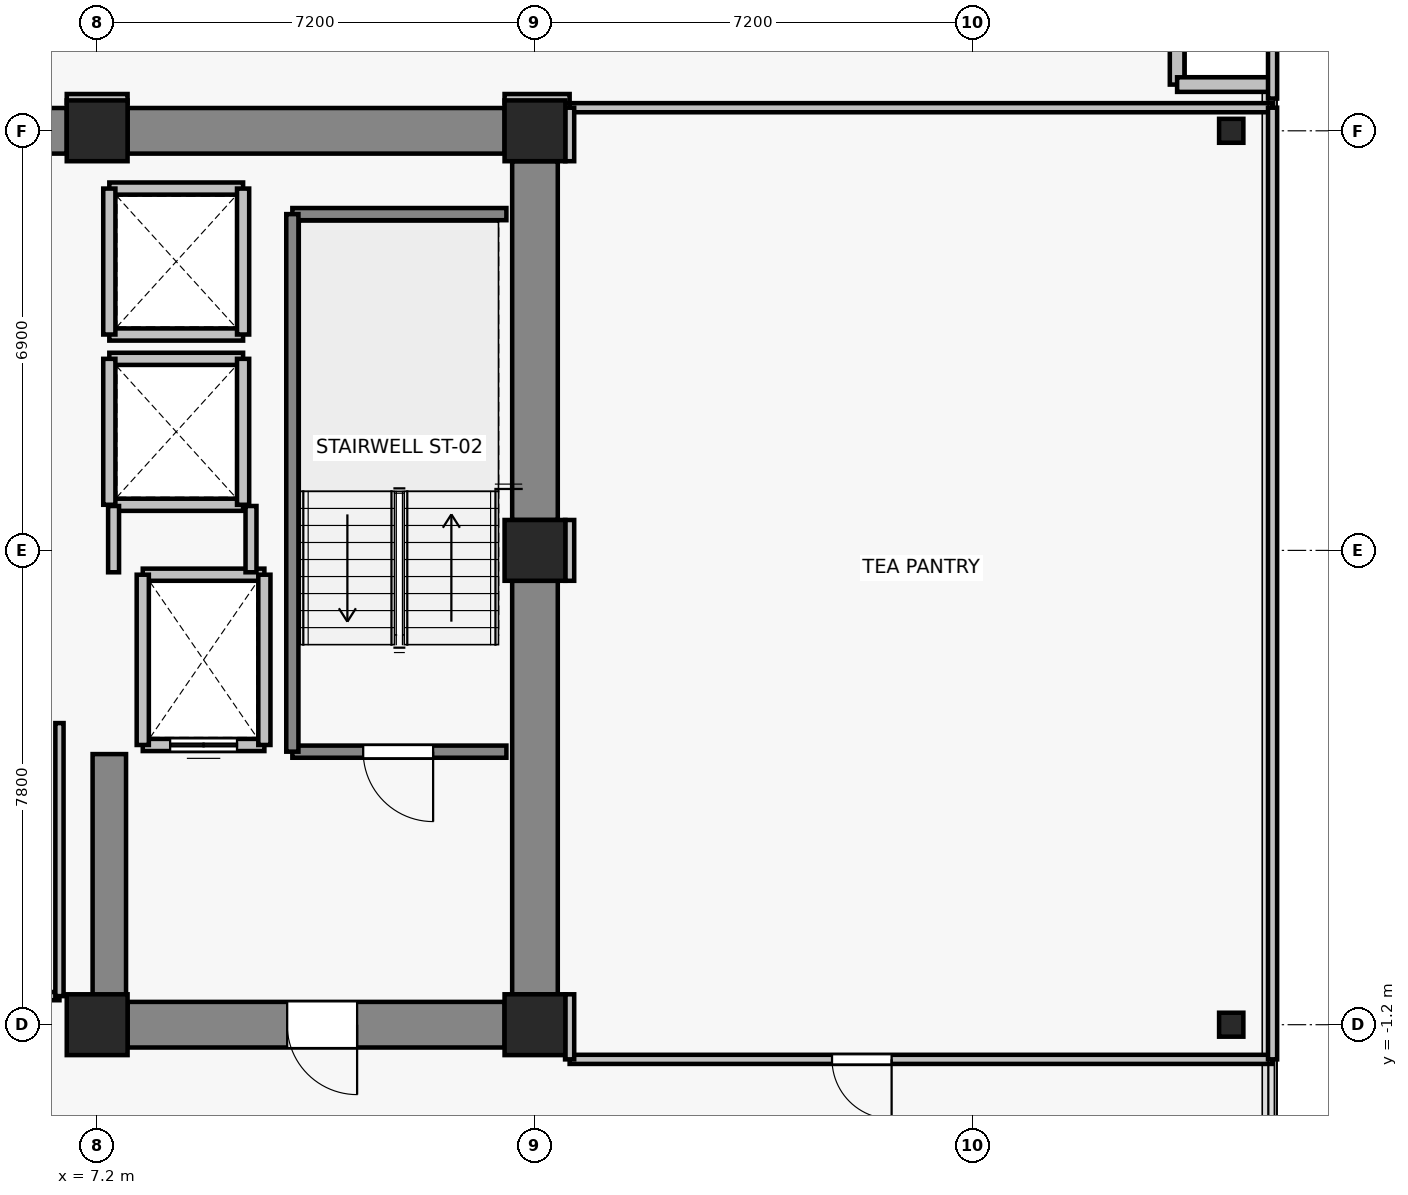
"""IFC4 building model, lengths in metres.
Left out: names, types, materials, properties, quantities, classifications, styles, units other than length and angle.
Written with IfcOpenShell. Run it as: python <this file> out.ifc"""

import sys

from ifc_helpers import new_model, si_unit, direction, frame, frame_2d, origin, origin_2d, place, context, subcontext, project, spatial, rectangle, i_section, extrude, source, transform, mapped, element, fill, save


model = new_model("IFC4")
c1 = context("Model", 3, precision=1e-05, world=origin(), true_north=direction((0.0, 1.0)))
c2 = subcontext(c1, "Body", "Model", "MODEL_VIEW")
j1 = project(units=[si_unit("LENGTHUNIT", "METRE"), si_unit("PLANEANGLEUNIT", "RADIAN")], contexts=[c1])
p1 = place(None, origin())
s1 = spatial("IfcSite", under=j1, at=p1, CompositionType="ELEMENT")
p2 = place(p1, origin())
s2 = spatial("IfcBuilding", under=s1, at=p2, CompositionType="ELEMENT")
p3 = place(p2, frame((0.0, 0.0, 172.6)))
s3 = spatial("IfcBuildingStorey", under=s2, at=p3, CompositionType="ELEMENT", Elevation=172.6)
for number, where, z_axis, x_axis in (
    (1, (7.2, -1.2, 0.0), (0.0, 0.0, 1.0), (1.0, 0.0, 0.0)),
    (2, (14.4, -1.2, 0.0), (0.0, 0.0, 1.0), (1.0, 0.0, 0.0)),
    (3, (14.4, 6.6, 0.0), (0.0, 0.0, 1.0), (1.0, 0.0, 0.0)),
    (4, (7.2, 13.5, 0.0), (0.0, 0.0, 1.0), (1.0, 0.0, 0.0)),
    (5, (14.4, 13.5, 0.0), (0.0, 0.0, 1.0), (1.0, 0.0, 0.0)),
):
    element("IfcColumn", number, at=place(p3, frame(where, z_axis=z_axis, x_axis=x_axis)), inside=s3, PredefinedType="COLUMN", context=c2, shape_type="SweptSolid", body=[
        extrude(rectangle(XDim=1.0, YDim=1.0, at=origin_2d()), origin(), (0.0, 0.0, 1.0), 3.3),
    ])
for number, where, z_axis, x_axis in (
    (6, (25.85, -1.2, 0.0), (0.0, 0.0, 1.0), (1.0, 0.0, 0.0)),
    (7, (25.85, 13.5, 0.0), (0.0, 0.0, 1.0), (1.0, 0.0, 0.0)),
):
    element("IfcColumn", number, at=place(p3, frame(where, z_axis=z_axis, x_axis=x_axis)), inside=s3, PredefinedType="COLUMN", context=c2, shape_type="SweptSolid", body=[
        extrude(i_section(OverallWidth=0.399, OverallDepth=0.394, WebThickness=0.023, FlangeThickness=0.037, FilletRadius=0.015, at=origin_2d()), origin(), (0.0, 0.0, 1.0), 3.3),
    ])
p4 = place(p3, frame((-6.7, 13.5, 0.0), z_axis=(0.0, 0.0, 1.0), x_axis=(1.0, 0.0, 0.0)))
e8 = element("IfcWall", 8, at=p4, inside=s3, PredefinedType="SHEAR", context=c2, shape_type="SweptSolid", body=[
    extrude(rectangle(XDim=13.4, YDim=0.75, at=frame_2d((6.7, 0.0))), origin(), (0.0, 0.0, 1.0), 3.075),
])
p5 = place(p3, frame((7.7, 13.5, 0.0), z_axis=(0.0, 0.0, 1.0), x_axis=(1.0, 0.0, 0.0)))
e9 = element("IfcWall", 9, at=p5, inside=s3, PredefinedType="SHEAR", context=c2, shape_type="SweptSolid", body=[
    extrude(rectangle(XDim=6.2, YDim=0.75, at=frame_2d((3.1, 0.0))), origin(), (0.0, 0.0, 1.0), 3.075),
])
p6 = place(p3, frame((14.4, -0.7, 0.0), z_axis=(0.0, 0.0, 1.0), x_axis=(0.0, 1.0, 0.0)))
e10 = element("IfcWall", 10, at=p6, inside=s3, PredefinedType="SHEAR", context=c2, shape_type="SweptSolid", body=[
    extrude(rectangle(XDim=6.8, YDim=0.75, at=frame_2d((3.4, 0.0))), origin(), (0.0, 0.0, 1.0), 3.075),
])
p7 = place(p3, frame((14.4, 7.1, 0.0), z_axis=(0.0, 0.0, 1.0), x_axis=(0.0, 1.0, 0.0)))
e11 = element("IfcWall", 11, at=p7, inside=s3, PredefinedType="SHEAR", context=c2, shape_type="SweptSolid", body=[
    extrude(rectangle(XDim=5.9, YDim=0.75, at=frame_2d((2.95, 0.0))), origin(), (0.0, 0.0, 1.0), 3.075),
])
p8 = place(p3, frame((13.9, -1.2, 0.0), z_axis=(0.0, 0.0, 1.0), x_axis=(-1.0, 0.0, 0.0)))
e12 = element("IfcWall", 12, at=p8, inside=s3, PredefinedType="SHEAR", context=c2, shape_type="SweptSolid", body=[
    extrude(rectangle(XDim=6.2, YDim=0.75, at=frame_2d((3.1, 0.0))), origin(), (0.0, 0.0, 1.0), 3.075),
])
p9 = place(p8, frame((2.425, 0.0, 0.0)))
e13 = element("IfcOpeningElement", 13, at=p9, cuts=e12, PredefinedType="OPENING", context=c2, shape_type="SweptSolid", body=[
    extrude(rectangle(XDim=1.15, YDim=2.15, at=frame_2d((0.575, 1.075))), frame((0.0, 0.385, 0.0), z_axis=(0.0, -1.0, 0.0), x_axis=(1.0, 0.0, 0.0)), (0.0, 0.0, 1.0), 0.77),
])
p10 = place(p3, frame((7.4, -0.825, 0.0), z_axis=(0.0, 0.0, 1.0), x_axis=(0.0, 1.0, 0.0)))
e14 = element("IfcWall", 14, at=p10, inside=s3, PredefinedType="SHEAR", context=c2, shape_type="SweptSolid", body=[
    extrude(rectangle(XDim=4.075, YDim=0.55, at=frame_2d((2.038, 0.0))), origin(), (0.0, 0.0, 1.0), 3.075),
])
for number, where, z_axis, x_axis in (
    (15, (24.96, 14.26, 0.0), (0.0, 0.0, 1.0), (0.0, 1.0, 0.0)),
    (16, (26.46, 14.26, 0.0), (0.0, 0.0, 1.0), (-1.0, 0.0, 0.0)),
):
    element("IfcWall", number, at=place(p3, frame(where, z_axis=z_axis, x_axis=x_axis)), inside=s3, PredefinedType="SOLIDWALL", context=c2, shape_type="SweptSolid", body=[
        extrude(rectangle(XDim=1.5, YDim=0.24, at=frame_2d((0.75, 0.0))), origin(), (0.0, 0.0, 1.0), 3.075),
    ])
p11 = place(p3, frame((9.95, 3.4, 0.0), z_axis=(0.0, 0.0, 1.0), x_axis=(-1.0, 0.0, 0.0)))
e17 = element("IfcWall", 17, at=p11, inside=s3, PredefinedType="SOLIDWALL", context=c2, shape_type="SweptSolid", body=[
    extrude(rectangle(XDim=2.0, YDim=0.2, at=frame_2d((1.0, 0.0))), origin(), (0.0, 0.0, 1.0), 3.075),
])
p12 = place(p11, frame((0.45, 0.0, 0.0)))
e18 = element("IfcOpeningElement", 18, at=p12, cuts=e17, PredefinedType="OPENING", context=c2, shape_type="SweptSolid", body=[
    extrude(rectangle(XDim=1.1, YDim=2.2, at=frame_2d((0.55, 1.1))), frame((0.0, 0.11, 0.0), z_axis=(0.0, -1.0, 0.0), x_axis=(1.0, 0.0, 0.0)), (0.0, 0.0, 1.0), 0.22),
])
p13 = place(p3, frame((7.95, 6.2, 0.0), z_axis=(0.0, 0.0, 1.0), x_axis=(1.0, 0.0, 0.0)))
e19 = element("IfcWall", 19, at=p13, inside=s3, PredefinedType="SOLIDWALL", context=c2, shape_type="SweptSolid", body=[
    extrude(rectangle(XDim=2.0, YDim=0.2, at=frame_2d((1.0, 0.0))), origin(), (0.0, 0.0, 1.0), 3.075),
])
for number, where, z_axis, x_axis in (
    (20, (7.95, 3.4, 0.0), (0.0, 0.0, 1.0), (0.0, 1.0, 0.0)),
    (21, (9.95, 6.2, 0.0), (0.0, 0.0, 1.0), (0.0, -1.0, 0.0)),
):
    element("IfcWall", number, at=place(p3, frame(where, z_axis=z_axis, x_axis=x_axis)), inside=s3, PredefinedType="SOLIDWALL", context=c2, shape_type="SweptSolid", body=[
        extrude(rectangle(XDim=2.8, YDim=0.2, at=frame_2d((1.4, 0.0))), origin(), (0.0, 0.0, 1.0), 3.075),
    ])
for number, where, z_axis, x_axis in (
    (22, (9.6, 7.35, 0.0), (0.0, 0.0, 1.0), (-1.0, 0.0, 0.0)),
    (23, (7.4, 9.75, 0.0), (0.0, 0.0, 1.0), (1.0, 0.0, 0.0)),
):
    element("IfcWall", number, at=place(p3, frame(where, z_axis=z_axis, x_axis=x_axis)), inside=s3, PredefinedType="SOLIDWALL", context=c2, shape_type="SweptSolid", body=[
        extrude(rectangle(XDim=2.2, YDim=0.2, at=frame_2d((1.1, 0.0))), origin(), (0.0, 0.0, 1.0), 2.565),
    ])
p14 = place(p3, frame((7.4, 7.35, 0.0), z_axis=(0.0, 0.0, 1.0), x_axis=(0.0, 1.0, 0.0)))
e24 = element("IfcWall", 24, at=p14, inside=s3, PredefinedType="SOLIDWALL", context=c2, shape_type="SweptSolid", body=[
    extrude(rectangle(XDim=2.4, YDim=0.2, at=frame_2d((1.2, 0.0))), origin(), (0.0, 0.0, 1.0), 2.565),
])
p15 = place(p3, frame((9.6, 9.75, 0.0), z_axis=(0.0, 0.0, 1.0), x_axis=(0.0, -1.0, 0.0)))
e25 = element("IfcWall", 25, at=p15, inside=s3, PredefinedType="SOLIDWALL", context=c2, shape_type="SweptSolid", body=[
    extrude(rectangle(XDim=2.4, YDim=0.2, at=frame_2d((1.2, 0.0))), origin(), (0.0, 0.0, 1.0), 3.075),
])
for number, where, z_axis, x_axis in (
    (26, (9.6, 10.15, 0.0), (0.0, 0.0, 1.0), (-1.0, 0.0, 0.0)),
    (27, (7.4, 12.55, 0.0), (0.0, 0.0, 1.0), (1.0, 0.0, 0.0)),
):
    element("IfcWall", number, at=place(p3, frame(where, z_axis=z_axis, x_axis=x_axis)), inside=s3, PredefinedType="SOLIDWALL", context=c2, shape_type="SweptSolid", body=[
        extrude(rectangle(XDim=2.2, YDim=0.2, at=frame_2d((1.1, 0.0))), origin(), (0.0, 0.0, 1.0), 2.565),
    ])
p16 = place(p3, frame((7.4, 10.15, 0.0), z_axis=(0.0, 0.0, 1.0), x_axis=(0.0, 1.0, 0.0)))
e28 = element("IfcWall", 28, at=p16, inside=s3, PredefinedType="SOLIDWALL", context=c2, shape_type="SweptSolid", body=[
    extrude(rectangle(XDim=2.4, YDim=0.2, at=frame_2d((1.2, 0.0))), origin(), (0.0, 0.0, 1.0), 2.565),
])
p17 = place(p3, frame((9.6, 12.55, 0.0), z_axis=(0.0, 0.0, 1.0), x_axis=(0.0, -1.0, 0.0)))
e29 = element("IfcWall", 29, at=p17, inside=s3, PredefinedType="SOLIDWALL", context=c2, shape_type="SweptSolid", body=[
    extrude(rectangle(XDim=2.4, YDim=0.2, at=frame_2d((1.2, 0.0))), origin(), (0.0, 0.0, 1.0), 3.075),
])
p18 = place(p3, frame((13.93, 3.29, 0.0), z_axis=(0.0, 0.0, 1.0), x_axis=(-1.0, 0.0, 0.0)))
e30 = element("IfcWall", 30, at=p18, inside=s3, PredefinedType="SOLIDWALL", context=c2, shape_type="SweptSolid", body=[
    extrude(rectangle(XDim=3.52, YDim=0.2, at=frame_2d((1.76, 0.0))), origin(), (0.0, 0.0, 1.0), 3.075),
])
p19 = place(p18, frame((1.205, 0.0, 0.0)))
e31 = element("IfcOpeningElement", 31, at=p19, cuts=e30, PredefinedType="OPENING", context=c2, shape_type="SweptSolid", body=[
    extrude(rectangle(XDim=1.15, YDim=2.15, at=frame_2d((0.575, 1.075))), frame((0.0, 0.11, 0.0), z_axis=(0.0, -1.0, 0.0), x_axis=(1.0, 0.0, 0.0)), (0.0, 0.0, 1.0), 0.22),
])
p20 = place(p3, frame((10.41, 12.13, 0.0), z_axis=(0.0, 0.0, 1.0), x_axis=(1.0, 0.0, 0.0)))
e32 = element("IfcWall", 32, at=p20, inside=s3, PredefinedType="SOLIDWALL", context=c2, shape_type="SweptSolid", body=[
    extrude(rectangle(XDim=3.52, YDim=0.2, at=frame_2d((1.76, 0.0))), origin(), (0.0, 0.0, 1.0), 3.075),
])
p21 = place(p3, frame((10.41, 3.29, 0.0), z_axis=(0.0, 0.0, 1.0), x_axis=(0.0, 1.0, 0.0)))
e33 = element("IfcWall", 33, at=p21, inside=s3, PredefinedType="SOLIDWALL", context=c2, shape_type="SweptSolid", body=[
    extrude(rectangle(XDim=8.84, YDim=0.2, at=frame_2d((4.42, 0.0))), origin(), (0.0, 0.0, 1.0), 3.075),
])
p22 = place(p3, frame((7.47, 6.24, 0.0), z_axis=(0.0, 0.0, 1.0), x_axis=(0.0, 1.0, 0.0)))
e34 = element("IfcWall", 34, at=p22, inside=s3, PredefinedType="PARTITIONING", context=c2, shape_type="SweptSolid", body=[
    extrude(rectangle(XDim=1.09, YDim=0.18, at=frame_2d((0.545, 0.0))), origin(), (0.0, 0.0, 1.0), 2.565),
])
p23 = place(p3, frame((9.73, 7.33, 0.0), z_axis=(0.0, 0.0, 1.0), x_axis=(0.0, -1.0, 0.0)))
e35 = element("IfcWall", 35, at=p23, inside=s3, PredefinedType="PARTITIONING", context=c2, shape_type="SweptSolid", body=[
    extrude(rectangle(XDim=1.09, YDim=0.18, at=frame_2d((0.545, 0.0))), origin(), (0.0, 0.0, 1.0), 3.075),
])
p24 = place(p3, frame((6.58, -0.73, 0.0), z_axis=(0.0, 0.0, 1.0), x_axis=(-1.0, 0.0, 0.0)))
e36 = element("IfcWall", 36, at=p24, inside=s3, PredefinedType="PARTITIONING", context=c2, shape_type="SweptSolid", body=[
    extrude(rectangle(XDim=2.9, YDim=0.135, at=frame_2d((1.45, 0.0))), origin(), (0.0, 0.0, 1.0), 3.075),
])
p25 = place(p24, frame((0.99, 0.0, 0.0)))
e37 = element("IfcOpeningElement", 37, at=p25, cuts=e36, PredefinedType="OPENING", context=c2, shape_type="SweptSolid", body=[
    extrude(rectangle(XDim=0.92, YDim=2.1, at=frame_2d((0.46, 1.05))), frame((0.0, 0.077, 0.0), z_axis=(0.0, -1.0, 0.0), x_axis=(1.0, 0.0, 0.0)), (0.0, 0.0, 1.0), 0.155),
])
p26 = place(p3, frame((6.58, 3.76, 0.0), z_axis=(0.0, 0.0, 1.0), x_axis=(0.0, -1.0, 0.0)))
e38 = element("IfcWall", 38, at=p26, inside=s3, PredefinedType="PARTITIONING", context=c2, shape_type="SweptSolid", body=[
    extrude(rectangle(XDim=4.49, YDim=0.135, at=frame_2d((2.245, 0.0))), origin(), (0.0, 0.0, 1.0), 3.075),
])
p27 = place(p3, frame((26.53, -1.77, 0.0), z_axis=(0.0, 0.0, 1.0), x_axis=(-1.0, 0.0, 0.0)))
e39 = element("IfcWall", 39, at=p27, inside=s3, PredefinedType="PARTITIONING", context=c2, shape_type="SweptSolid", body=[
    extrude(rectangle(XDim=11.56, YDim=0.15, at=frame_2d((5.78, 0.0))), origin(), (0.0, 0.0, 1.0), 2.565),
])
p28 = place(p27, frame((6.265, 0.0, 0.0)))
e40 = element("IfcOpeningElement", 40, at=p28, cuts=e39, PredefinedType="OPENING", context=c2, shape_type="SweptSolid", body=[
    extrude(rectangle(XDim=0.98, YDim=2.15, at=frame_2d((0.49, 1.075))), frame((0.0, 0.085, 0.0), z_axis=(0.0, -1.0, 0.0), x_axis=(1.0, 0.0, 0.0)), (0.0, 0.0, 1.0), 0.17),
])
p29 = place(p3, frame((14.97, 13.88, 0.0), z_axis=(0.0, 0.0, 1.0), x_axis=(1.0, 0.0, 0.0)))
e41 = element("IfcWall", 41, at=p29, inside=s3, PredefinedType="PARTITIONING", context=c2, shape_type="SweptSolid", body=[
    extrude(rectangle(XDim=11.56, YDim=0.15, at=frame_2d((5.78, 0.0))), origin(), (0.0, 0.0, 1.0), 3.075),
])
p30 = place(p3, frame((14.97, -1.77, 0.0), z_axis=(0.0, 0.0, 1.0), x_axis=(0.0, 1.0, 0.0)))
e42 = element("IfcWall", 42, at=p30, inside=s3, PredefinedType="PARTITIONING", context=c2, shape_type="SweptSolid", body=[
    extrude(rectangle(XDim=1.07, YDim=0.15, at=frame_2d((0.535, 0.0))), origin(), (0.0, 0.0, 1.0), 2.565),
])
p31 = place(p3, frame((14.97, 6.1, 0.0), z_axis=(0.0, 0.0, 1.0), x_axis=(0.0, 1.0, 0.0)))
e43 = element("IfcWall", 43, at=p31, inside=s3, PredefinedType="PARTITIONING", context=c2, shape_type="SweptSolid", body=[
    extrude(rectangle(XDim=1.0, YDim=0.15, at=frame_2d((0.5, 0.0))), origin(), (0.0, 0.0, 1.0), 3.075),
])
p32 = place(p3, frame((14.97, 13.0, 0.0), z_axis=(0.0, 0.0, 1.0), x_axis=(0.0, 1.0, 0.0)))
e44 = element("IfcWall", 44, at=p32, inside=s3, PredefinedType="PARTITIONING", context=c2, shape_type="SweptSolid", body=[
    extrude(rectangle(XDim=0.88, YDim=0.15, at=frame_2d((0.44, 0.0))), origin(), (0.0, 0.0, 1.0), 2.565),
])
p33 = place(p3, frame((26.53, 13.88, 0.0), z_axis=(0.0, 0.0, 1.0), x_axis=(0.0, -1.0, 0.0)))
e45 = element("IfcWall", 45, at=p33, inside=s3, PredefinedType="PARTITIONING", context=c2, shape_type="SweptSolid", body=[
    extrude(rectangle(XDim=15.65, YDim=0.15, at=frame_2d((7.825, 0.0))), origin(), (0.0, 0.0, 1.0), 3.075),
])
p34 = place(p3, frame((7.7, 14.03, 0.0), z_axis=(0.0, 0.0, 1.0), x_axis=(-1.0, 0.0, 0.0)))
e46 = element("IfcWall", 46, at=p34, inside=s3, PredefinedType="PARTITIONING", context=c2, shape_type="SweptSolid", body=[
    extrude(rectangle(XDim=1.0, YDim=0.15, at=frame_2d((0.5, 0.0))), origin(), (0.0, 0.0, 1.0), 2.565),
])
p35 = place(p3, frame((14.97, 14.03, 0.0), z_axis=(0.0, 0.0, 1.0), x_axis=(-1.0, 0.0, 0.0)))
e47 = element("IfcWall", 47, at=p35, inside=s3, PredefinedType="PARTITIONING", context=c2, shape_type="SweptSolid", body=[
    extrude(rectangle(XDim=1.07, YDim=0.15, at=frame_2d((0.535, 0.0))), origin(), (0.0, 0.0, 1.0), 2.565),
])
p36 = place(p3, frame((26.53, 17.33, 0.0), z_axis=(0.0, 0.0, 1.0), x_axis=(0.0, -1.0, 0.0)))
e48 = element("IfcWall", 48, at=p36, inside=s3, PredefinedType="PARTITIONING", context=c2, shape_type="SweptSolid", body=[
    extrude(rectangle(XDim=3.3, YDim=0.15, at=frame_2d((1.65, 0.0))), origin(), (0.0, 0.0, 1.0), 3.075),
])
m1 = source(origin(), c2, "Body", "SweptSolid", [
    extrude(rectangle(XDim=1.1, YDim=2.2, at=frame_2d((0.55, 1.1))), frame((0.0, 0.025, 0.0), z_axis=(0.0, -1.0, 0.0), x_axis=(1.0, 0.0, 0.0)), (0.0, 0.0, 1.0), 0.05),
])
p37 = place(p12, origin())
e49 = element("IfcDoor", 49, at=p37, inside=s3, OperationType="DOUBLE_DOOR_SLIDING", PredefinedType="DOOR", context=c2, shape_type="MappedRepresentation", body=[
    mapped(m1, transform((0.0, 0.0, 0.0), x_axis=(1.0, 0.0, 0.0), y_axis=(0.0, 1.0, 0.0), z_axis=(0.0, 0.0, 1.0), scale=1.0)),
])
fill(e18, e49)
m2 = source(origin(), c2, "Body", "SweptSolid", [
    extrude(rectangle(XDim=1.15, YDim=2.15, at=frame_2d((0.575, 1.075))), frame((0.0, 0.025, 0.0), z_axis=(0.0, -1.0, 0.0), x_axis=(1.0, 0.0, 0.0)), (0.0, 0.0, 1.0), 0.05),
])
p38 = place(p19, origin())
e50 = element("IfcDoor", 50, at=p38, inside=s3, OperationType="SINGLE_SWING_LEFT", PredefinedType="DOOR", context=c2, shape_type="MappedRepresentation", body=[
    mapped(m2, transform((0.0, 0.0, 0.0), x_axis=(1.0, 0.0, 0.0), y_axis=(0.0, 1.0, 0.0), z_axis=(0.0, 0.0, 1.0), scale=1.0)),
])
fill(e31, e50)
p39 = place(p9, origin())
e51 = element("IfcDoor", 51, at=p39, inside=s3, OperationType="SINGLE_SWING_LEFT", PredefinedType="DOOR", context=c2, shape_type="MappedRepresentation", body=[
    mapped(m2, transform((0.0, 0.0, 0.0), x_axis=(1.0, 0.0, 0.0), y_axis=(0.0, 1.0, 0.0), z_axis=(0.0, 0.0, 1.0), scale=1.0)),
])
fill(e13, e51)
m3 = source(origin(), c2, "Body", "SweptSolid", [
    extrude(rectangle(XDim=0.98, YDim=2.15, at=frame_2d((0.49, 1.075))), frame((0.0, 0.025, 0.0), z_axis=(0.0, -1.0, 0.0), x_axis=(1.0, 0.0, 0.0)), (0.0, 0.0, 1.0), 0.05),
])
p40 = place(p28, origin())
e52 = element("IfcDoor", 52, at=p40, inside=s3, OperationType="SINGLE_SWING_LEFT", PredefinedType="DOOR", context=c2, shape_type="MappedRepresentation", body=[
    mapped(m3, transform((0.0, 0.0, 0.0), x_axis=(1.0, 0.0, 0.0), y_axis=(0.0, 1.0, 0.0), z_axis=(0.0, 0.0, 1.0), scale=1.0)),
])
fill(e40, e52)
save(model, sys.argv[1])
